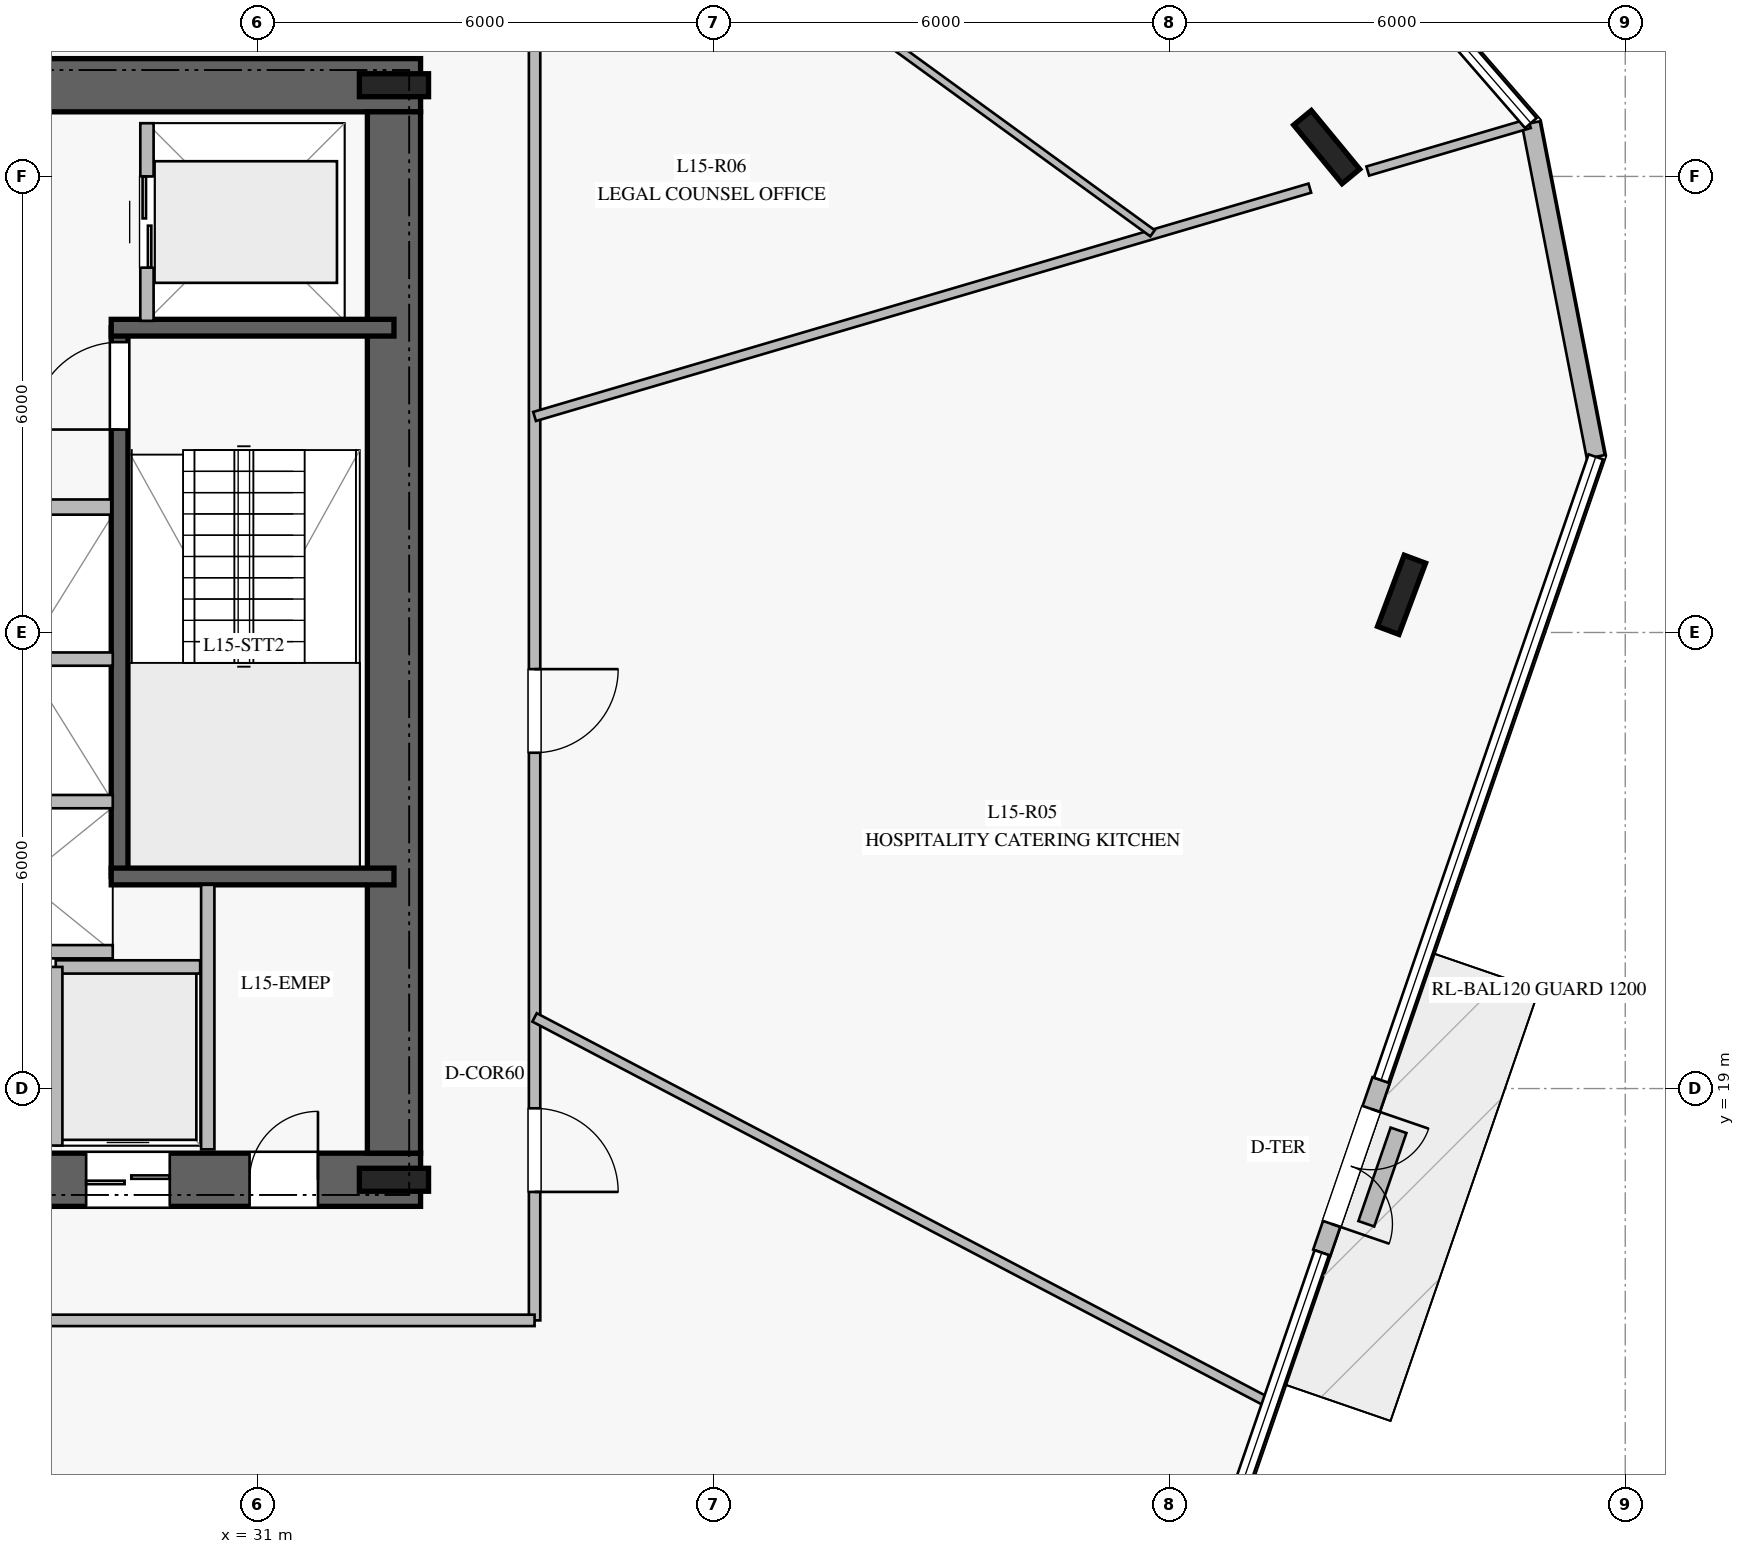
"""IFC4 building model, lengths in metres.
Left out: names, types, materials, properties, quantities, classifications, styles, units other than length and angle.
Written with IfcOpenShell. Run it as: python <this file> out.ifc"""

import sys

from ifc_helpers import new_model, si_unit, direction, frame, frame_2d, origin, origin_2d, place, context, subcontext, project, spatial, rectangle, i_section, extrude, element, fill, save


model = new_model("IFC4")
c1 = context("Model", 3, precision=1e-05, world=origin(), true_north=direction((0.0, 1.0)))
c2 = subcontext(c1, "Body", "Model", "MODEL_VIEW")
j1 = project(units=[si_unit("LENGTHUNIT", "METRE"), si_unit("PLANEANGLEUNIT", "RADIAN")], contexts=[c1])
p1 = place(None, origin())
s1 = spatial("IfcSite", under=j1, at=p1, CompositionType="ELEMENT")
p2 = place(p1, origin())
s2 = spatial("IfcBuilding", under=s1, at=p2, CompositionType="ELEMENT")
p3 = place(p2, frame((0.0, 0.0, 64.0)))
s3 = spatial("IfcBuildingStorey", under=s2, at=p3, CompositionType="ELEMENT", Elevation=64.0)
p4 = place(p3, frame((16.85, 17.8, 0.0), z_axis=(0.0, 0.0, 1.0), x_axis=(1.0, 0.0, 0.0)))
e1 = element("IfcWall", 1, at=p4, inside=s3, PredefinedType="SHEAR", context=c2, shape_type="SweptSolid", body=[
    extrude(rectangle(XDim=16.3, YDim=0.7, at=frame_2d((8.15, 0.0))), origin(), (0.0, 0.0, 1.0), 3.76),
])
p5 = place(p4, frame((5.1, 0.0, 0.0)))
e2 = element("IfcOpeningElement", 2, at=p5, cuts=e1, PredefinedType="OPENING", context=c2, shape_type="SweptSolid", body=[
    extrude(rectangle(XDim=1.2, YDim=2.25, at=frame_2d((0.6, 1.125))), frame((0.0, 0.36, 0.0), z_axis=(0.0, -1.0, 0.0), x_axis=(1.0, 0.0, 0.0)), (0.0, 0.0, 1.0), 0.72),
])
p6 = place(p4, frame((14.05, 0.0, 0.0)))
e3 = element("IfcOpeningElement", 3, at=p6, cuts=e1, PredefinedType="OPENING", context=c2, shape_type="SweptSolid", body=[
    extrude(rectangle(XDim=0.9, YDim=2.1, at=frame_2d((0.45, 1.05))), frame((0.0, 0.36, 0.0), z_axis=(0.0, -1.0, 0.0), x_axis=(1.0, 0.0, 0.0)), (0.0, 0.0, 1.0), 0.72),
])
p7 = place(p4, frame((7.95, 0.0, 0.0)))
e4 = element("IfcOpeningElement", 4, at=p7, cuts=e1, PredefinedType="OPENING", context=c2, shape_type="SweptSolid", body=[
    extrude(rectangle(XDim=1.1, YDim=2.2, at=frame_2d((0.55, 1.1))), frame((0.0, 0.36, 0.0), z_axis=(0.0, -1.0, 0.0), x_axis=(1.0, 0.0, 0.0)), (0.0, 0.0, 1.0), 0.72),
])
p8 = place(p4, frame((9.925, 0.0, 0.0)))
e5 = element("IfcOpeningElement", 5, at=p8, cuts=e1, PredefinedType="OPENING", context=c2, shape_type="SweptSolid", body=[
    extrude(rectangle(XDim=1.1, YDim=2.2, at=frame_2d((0.55, 1.1))), frame((0.0, 0.36, 0.0), z_axis=(0.0, -1.0, 0.0), x_axis=(1.0, 0.0, 0.0)), (0.0, 0.0, 1.0), 0.72),
])
p9 = place(p4, frame((11.9, 0.0, 0.0)))
e6 = element("IfcOpeningElement", 6, at=p9, cuts=e1, PredefinedType="OPENING", context=c2, shape_type="SweptSolid", body=[
    extrude(rectangle(XDim=1.1, YDim=2.2, at=frame_2d((0.55, 1.1))), frame((0.0, 0.36, 0.0), z_axis=(0.0, -1.0, 0.0), x_axis=(1.0, 0.0, 0.0)), (0.0, 0.0, 1.0), 0.72),
])
p10 = place(p3, frame((33.15, 32.2, 0.0), z_axis=(0.0, 0.0, 1.0), x_axis=(-1.0, 0.0, 0.0)))
e7 = element("IfcWall", 7, at=p10, inside=s3, PredefinedType="SHEAR", context=c2, shape_type="SweptSolid", body=[
    extrude(rectangle(XDim=16.3, YDim=0.7, at=frame_2d((8.15, 0.0))), origin(), (0.0, 0.0, 1.0), 3.76),
])
p11 = place(p10, frame((5.1, 0.0, 0.0)))
e8 = element("IfcOpeningElement", 8, at=p11, cuts=e7, PredefinedType="OPENING", context=c2, shape_type="SweptSolid", body=[
    extrude(rectangle(XDim=1.2, YDim=2.25, at=frame_2d((0.6, 1.125))), frame((0.0, 0.36, 0.0), z_axis=(0.0, -1.0, 0.0), x_axis=(1.0, 0.0, 0.0)), (0.0, 0.0, 1.0), 0.72),
])
p12 = place(p3, frame((32.8, 18.15, 0.0), z_axis=(0.0, 0.0, 1.0), x_axis=(0.0, 1.0, 0.0)))
e9 = element("IfcWall", 9, at=p12, inside=s3, PredefinedType="SHEAR", context=c2, shape_type="SweptSolid", body=[
    extrude(rectangle(XDim=13.7, YDim=0.7, at=frame_2d((6.85, 0.0))), origin(), (0.0, 0.0, 1.0), 3.76),
])
for number, where, z_axis, x_axis in (
    (10, (32.8, 17.8, 0.0), (0.0, 0.0, 1.0), (1.0, 0.0, 0.0)),
    (11, (32.8, 32.2, 0.0), (0.0, 0.0, 1.0), (1.0, 0.0, 0.0)),
):
    element("IfcColumn", number, at=place(p3, frame(where, z_axis=z_axis, x_axis=x_axis)), inside=s3, PredefinedType="COLUMN", context=c2, shape_type="SweptSolid", body=[
        extrude(i_section(OverallWidth=0.302, OverallDepth=0.91, WebThickness=0.021, FlangeThickness=0.04, at=origin_2d()), origin(), (0.0, 0.0, 1.0), 4.0),
    ])
p13 = place(p3, frame((29.19, 21.79, 0.0), z_axis=(0.0, 0.0, 1.0), x_axis=(0.0, 1.0, 0.0)))
e12 = element("IfcWall", 12, at=p13, inside=s3, PredefinedType="SOLIDWALL", context=c2, shape_type="SweptSolid", body=[
    extrude(rectangle(XDim=7.22, YDim=0.22, at=frame_2d((3.61, 0.0))), origin(), (0.0, 0.0, 1.0), 3.76),
])
p14 = place(p13, frame((5.88, 0.0, 0.0)))
e13 = element("IfcOpeningElement", 13, at=p14, cuts=e12, PredefinedType="OPENING", context=c2, shape_type="SweptSolid", body=[
    extrude(rectangle(XDim=1.15, YDim=2.2, at=frame_2d((0.575, 1.1))), frame((0.0, 0.12, 0.0), z_axis=(0.0, -1.0, 0.0), x_axis=(1.0, 0.0, 0.0)), (0.0, 0.0, 1.0), 0.24),
])
for number, where, z_axis, x_axis in (
    (14, (29.08, 21.79, 0.0), (0.0, 0.0, 1.0), (1.0, 0.0, 0.0)),
    (15, (29.08, 29.01, 0.0), (0.0, 0.0, 1.0), (1.0, 0.0, 0.0)),
):
    element("IfcWall", number, at=place(p3, frame(where, z_axis=z_axis, x_axis=x_axis)), inside=s3, PredefinedType="SOLIDWALL", context=c2, shape_type="SweptSolid", body=[
        extrude(rectangle(XDim=3.72, YDim=0.22, at=frame_2d((1.86, 0.0))), origin(), (0.0, 0.0, 1.0), 3.76),
    ])
for number, where, z_axis, x_axis in (
    (16, (45.072, 31.386, 0.0), (0.0, 0.0, 1.0), (-0.636, 0.772, 0.0)),
    (17, (46.057, 25.496, 0.0), (0.0, 0.0, 1.0), (0.35, 0.937, 0.0)),
):
    element("IfcColumn", number, at=place(p3, frame(where, z_axis=z_axis, x_axis=x_axis)), inside=s3, PredefinedType="COLUMN", context=c2, shape_type="SweptSolid", body=[
        extrude(i_section(OverallWidth=0.3, OverallDepth=1.0, WebThickness=0.019, FlangeThickness=0.036, at=origin_2d()), origin(), (0.0, 0.0, 1.0), 4.0),
    ])
p15 = place(p3, frame((45.007, 16.841, 0.0), z_axis=(0.0, 0.0, 1.0), x_axis=(0.32533555883, 0.945598632698, 0.0)))
e18 = element("IfcWall", 18, at=p15, inside=s3, PredefinedType="STANDARD", context=c2, shape_type="SweptSolid", body=[
    extrude(rectangle(XDim=2.401, YDim=0.24, at=frame_2d((1.2, 0.0))), origin(), (0.0, 0.0, 1.0), 3.76),
])
p16 = place(p15, frame((0.4, 0.0, 0.0)))
e19 = element("IfcOpeningElement", 19, at=p16, cuts=e18, PredefinedType="OPENING", context=c2, shape_type="SweptSolid", body=[
    extrude(rectangle(XDim=1.6, YDim=2.25, at=frame_2d((0.8, 1.125))), frame((0.0, 0.13, 0.0), z_axis=(0.0, -1.0, 0.0), x_axis=(1.0, 0.0, 0.0)), (0.0, 0.0, 1.0), 0.26),
])
p17 = place(p3, frame((48.612, 27.311, 0.0), z_axis=(0.0, 0.0, 1.0), x_axis=(-0.190917867073, 0.981606014668, 0.0)))
e20 = element("IfcWall", 20, at=p17, inside=s3, PredefinedType="STANDARD", context=c2, shape_type="SweptSolid", body=[
    extrude(rectangle(XDim=4.473, YDim=0.24, at=frame_2d((2.237, 0.0))), origin(), (0.0, 0.0, 1.0), 3.76),
])
p18 = place(p3, frame((45.593, 17.221, 0.0), z_axis=(0.0, 0.0, 1.0), x_axis=(0.325950201404, 0.945386939938, 0.0)))
e21 = element("IfcWall", 21, at=p18, inside=s3, PredefinedType="USERDEFINED", context=c2, shape_type="SweptSolid", body=[
    extrude(rectangle(XDim=1.301, YDim=0.22, at=frame_2d((0.65, 0.0))), origin(), (0.0, 0.0, 1.0), 0.4),
])
p19 = place(p3, frame((25.7, 26.65, 0.0), z_axis=(0.0, 0.0, 1.0), x_axis=(1.0, 0.0, 0.0)))
e22 = element("IfcWall", 22, at=p19, inside=s3, PredefinedType="PARTITIONING", context=c2, shape_type="SweptSolid", body=[
    extrude(rectangle(XDim=3.38, YDim=0.2, at=frame_2d((1.69, 0.0))), origin(), (0.0, 0.0, 1.0), 3.76),
])
p20 = place(p3, frame((30.35, 18.2, 0.0), z_axis=(0.0, 0.0, 1.0), x_axis=(0.0, 1.0, 0.0)))
e23 = element("IfcWall", 23, at=p20, inside=s3, PredefinedType="PARTITIONING", context=c2, shape_type="SweptSolid", body=[
    extrude(rectangle(XDim=3.48, YDim=0.175, at=frame_2d((1.74, 0.0))), origin(), (0.0, 0.0, 1.0), 3.76),
])
p21 = place(p3, frame((28.35, 20.6, 0.0), z_axis=(0.0, 0.0, 1.0), x_axis=(1.0, 0.0, 0.0)))
e24 = element("IfcWall", 24, at=p21, inside=s3, PredefinedType="PARTITIONING", context=c2, shape_type="SweptSolid", body=[
    extrude(rectangle(XDim=1.9, YDim=0.175, at=frame_2d((0.95, 0.0))), origin(), (0.0, 0.0, 1.0), 3.76),
])
for number, where, z_axis, x_axis in (
    (25, (28.35, 18.25, 0.0), (0.0, 0.0, 1.0), (0.0, 1.0, 0.0)),
    (26, (26.75, 20.8, 0.0), (0.0, 0.0, 1.0), (1.0, 0.0, 0.0)),
    (27, (26.75, 22.775, 0.0), (0.0, 0.0, 1.0), (1.0, 0.0, 0.0)),
    (28, (26.75, 24.65, 0.0), (0.0, 0.0, 1.0), (1.0, 0.0, 0.0)),
):
    element("IfcWall", number, at=place(p3, frame(where, z_axis=z_axis, x_axis=x_axis)), inside=s3, PredefinedType="PARTITIONING", context=c2, shape_type="SweptSolid", body=[
        extrude(rectangle(XDim=2.35, YDim=0.175, at=frame_2d((1.175, 0.0))), origin(), (0.0, 0.0, 1.0), 3.76),
    ])
p22 = place(p3, frame((29.55, 29.1, 0.0), z_axis=(0.0, 0.0, 1.0), x_axis=(0.0, 1.0, 0.0)))
e29 = element("IfcWall", 29, at=p22, inside=s3, PredefinedType="PARTITIONING", context=c2, shape_type="SweptSolid", body=[
    extrude(rectangle(XDim=2.6, YDim=0.175, at=frame_2d((1.3, 0.0))), origin(), (0.0, 0.0, 1.0), 3.76),
])
p23 = place(p22, frame((0.7, 0.0, 0.0)))
e30 = element("IfcOpeningElement", 30, at=p23, cuts=e29, PredefinedType="OPENING", context=c2, shape_type="SweptSolid", body=[
    extrude(rectangle(XDim=1.2, YDim=2.2, at=frame_2d((0.6, 1.1))), frame((0.0, 0.098, 0.0), z_axis=(0.0, -1.0, 0.0), x_axis=(1.0, 0.0, 0.0)), (0.0, 0.0, 1.0), 0.195),
])
p24 = place(p3, frame((34.65, 34.05, 0.0), z_axis=(0.0, 0.0, 1.0), x_axis=(0.0, -1.0, 0.0)))
e31 = element("IfcWall", 31, at=p24, inside=s3, PredefinedType="PARTITIONING", context=c2, shape_type="SweptSolid", body=[
    extrude(rectangle(XDim=18.1, YDim=0.15, at=frame_2d((9.05, 0.0))), origin(), (0.0, 0.0, 1.0), 3.21),
])
p25 = place(p24, frame((15.31, 0.0, 0.0)))
e32 = element("IfcOpeningElement", 32, at=p25, cuts=e31, PredefinedType="OPENING", context=c2, shape_type="SweptSolid", body=[
    extrude(rectangle(XDim=1.1, YDim=2.2, at=frame_2d((0.55, 1.1))), frame((0.0, 0.085, 0.0), z_axis=(0.0, -1.0, 0.0), x_axis=(1.0, 0.0, 0.0)), (0.0, 0.0, 1.0), 0.17),
])
p26 = place(p24, frame((9.532, 0.0, 0.0)))
e33 = element("IfcOpeningElement", 33, at=p26, cuts=e31, PredefinedType="OPENING", context=c2, shape_type="SweptSolid", body=[
    extrude(rectangle(XDim=1.1, YDim=2.2, at=frame_2d((0.55, 1.1))), frame((0.0, 0.085, 0.0), z_axis=(0.0, -1.0, 0.0), x_axis=(1.0, 0.0, 0.0)), (0.0, 0.0, 1.0), 0.17),
])
p27 = place(p3, frame((34.65, 15.95, 0.0), z_axis=(0.0, 0.0, 1.0), x_axis=(-1.0, 0.0, 0.0)))
e34 = element("IfcWall", 34, at=p27, inside=s3, PredefinedType="PARTITIONING", context=c2, shape_type="SweptSolid", body=[
    extrude(rectangle(XDim=19.3, YDim=0.15, at=frame_2d((9.65, 0.0))), origin(), (0.0, 0.0, 1.0), 3.21),
])
p28 = place(p27, frame((12.856, 0.0, 0.0)))
e35 = element("IfcOpeningElement", 35, at=p28, cuts=e34, PredefinedType="OPENING", context=c2, shape_type="SweptSolid", body=[
    extrude(rectangle(XDim=1.1, YDim=2.2, at=frame_2d((0.55, 1.1))), frame((0.0, 0.085, 0.0), z_axis=(0.0, -1.0, 0.0), x_axis=(1.0, 0.0, 0.0)), (0.0, 0.0, 1.0), 0.17),
])
p29 = place(p3, frame((26.759, 15.95, 0.0), z_axis=(0.0, 0.0, 1.0), x_axis=(0.190830458369, -0.981623011221, 0.0)))
e36 = element("IfcWall", 36, at=p29, inside=s3, PredefinedType="PARTITIONING", context=c2, shape_type="SweptSolid", body=[
    extrude(rectangle(XDim=12.336, YDim=0.125, at=frame_2d((6.168, 0.0))), origin(), (0.0, 0.0, 1.0), 3.02),
])
p30 = place(p3, frame((34.65, 19.936, 0.0), z_axis=(0.0, 0.0, 1.0), x_axis=(0.885490007515, -0.464658419262, 0.0)))
e37 = element("IfcWall", 37, at=p30, inside=s3, PredefinedType="PARTITIONING", context=c2, shape_type="SweptSolid", body=[
    extrude(rectangle(XDim=10.907, YDim=0.125, at=frame_2d((5.454, 0.0))), origin(), (0.0, 0.0, 1.0), 3.05),
])
p31 = place(p3, frame((34.65, 27.842, 0.0), z_axis=(0.0, 0.0, 1.0), x_axis=(0.959267461701, 0.282499445878, 0.0)))
e38 = element("IfcWall", 38, at=p31, inside=s3, PredefinedType="PARTITIONING", context=c2, shape_type="SweptSolid", body=[
    extrude(rectangle(XDim=10.633, YDim=0.125, at=frame_2d((5.317, 0.0))), origin(), (0.0, 0.0, 1.0), 3.06),
])
p32 = place(p3, frame((45.612, 31.071, 0.0), z_axis=(0.0, 0.0, 1.0), x_axis=(0.95931639147, 0.282333244689, 0.0)))
e39 = element("IfcWall", 39, at=p32, inside=s3, PredefinedType="PARTITIONING", context=c2, shape_type="SweptSolid", body=[
    extrude(rectangle(XDim=2.217, YDim=0.125, at=frame_2d((1.108, 0.0))), origin(), (0.0, 0.0, 1.0), 3.76),
])
p33 = place(p3, frame((42.78, 30.252, 0.0), z_axis=(0.0, 0.0, 1.0), x_axis=(-0.808986344623, 0.587827435744, 0.0)))
e40 = element("IfcWall", 40, at=p33, inside=s3, PredefinedType="MOVABLE", context=c2, shape_type="SweptSolid", body=[
    extrude(rectangle(XDim=14.297, YDim=0.1, at=frame_2d((7.148, 0.0))), origin(), (0.0, 0.0, 1.0), 3.21),
])
p34 = place(p33, frame((6.56, 0.0, 0.0)))
e41 = element("IfcOpeningElement", 41, at=p34, cuts=e40, PredefinedType="OPENING", context=c2, shape_type="SweptSolid", body=[
    extrude(rectangle(XDim=1.0, YDim=2.15, at=frame_2d((0.5, 1.075))), frame((0.0, 0.06, 0.0), z_axis=(0.0, -1.0, 0.0), x_axis=(1.0, 0.0, 0.0)), (0.0, 0.0, 1.0), 0.12),
])
p35 = place(p16, frame((1.6, 0.0, 0.0), z_axis=(0.0, 0.0, 1.0), x_axis=(-1.0, 0.0, 0.0)))
e42 = element("IfcDoor", 42, at=p35, inside=s3, OperationType="DOUBLE_DOOR_SINGLE_SWING", PredefinedType="DOOR", context=c2, shape_type="SweptSolid", body=[
    extrude(rectangle(XDim=1.6, YDim=2.25, at=frame_2d((0.8, 1.125))), frame((0.0, 0.025, 0.0), z_axis=(0.0, -1.0, 0.0), x_axis=(1.0, 0.0, 0.0)), (0.0, 0.0, 1.0), 0.05),
])
fill(e19, e42)
p36 = place(p14, origin())
e43 = element("IfcDoor", 43, at=p36, inside=s3, OperationType="SINGLE_SWING_LEFT", PredefinedType="DOOR", context=c2, shape_type="SweptSolid", body=[
    extrude(rectangle(XDim=1.15, YDim=2.2, at=frame_2d((0.575, 1.1))), frame((0.0, 0.025, 0.0), z_axis=(0.0, -1.0, 0.0), x_axis=(1.0, 0.0, 0.0)), (0.0, 0.0, 1.0), 0.05),
])
fill(e13, e43)
p37 = place(p6, origin())
e44 = element("IfcDoor", 44, at=p37, inside=s3, OperationType="SINGLE_SWING_RIGHT", PredefinedType="DOOR", context=c2, shape_type="SweptSolid", body=[
    extrude(rectangle(XDim=0.9, YDim=2.1, at=frame_2d((0.45, 1.05))), frame((0.0, 0.025, 0.0), z_axis=(0.0, -1.0, 0.0), x_axis=(1.0, 0.0, 0.0)), (0.0, 0.0, 1.0), 0.05),
])
fill(e3, e44)
p38 = place(p9, origin())
e45 = element("IfcDoor", 45, at=p38, inside=s3, OperationType="DOUBLE_DOOR_SLIDING", PredefinedType="DOOR", context=c2, shape_type="SweptSolid", body=[
    extrude(rectangle(XDim=1.1, YDim=2.2, at=frame_2d((0.55, 1.1))), frame((0.0, 0.025, 0.0), z_axis=(0.0, -1.0, 0.0), x_axis=(1.0, 0.0, 0.0)), (0.0, 0.0, 1.0), 0.05),
])
fill(e6, e45)
p39 = place(p23, origin())
e46 = element("IfcDoor", 46, at=p39, inside=s3, OperationType="DOUBLE_DOOR_SLIDING", PredefinedType="DOOR", context=c2, shape_type="SweptSolid", body=[
    extrude(rectangle(XDim=1.2, YDim=2.2, at=frame_2d((0.6, 1.1))), frame((0.0, 0.025, 0.0), z_axis=(0.0, -1.0, 0.0), x_axis=(1.0, 0.0, 0.0)), (0.0, 0.0, 1.0), 0.05),
])
fill(e30, e46)
p40 = place(p25, origin())
e47 = element("IfcDoor", 47, at=p40, inside=s3, OperationType="SINGLE_SWING_RIGHT", PredefinedType="DOOR", context=c2, shape_type="SweptSolid", body=[
    extrude(rectangle(XDim=1.1, YDim=2.2, at=frame_2d((0.55, 1.1))), frame((0.0, 0.025, 0.0), z_axis=(0.0, -1.0, 0.0), x_axis=(1.0, 0.0, 0.0)), (0.0, 0.0, 1.0), 0.05),
])
fill(e32, e47)
p41 = place(p26, origin())
e48 = element("IfcDoor", 48, at=p41, inside=s3, OperationType="SINGLE_SWING_LEFT", PredefinedType="DOOR", context=c2, shape_type="SweptSolid", body=[
    extrude(rectangle(XDim=1.1, YDim=2.2, at=frame_2d((0.55, 1.1))), frame((0.0, 0.025, 0.0), z_axis=(0.0, -1.0, 0.0), x_axis=(1.0, 0.0, 0.0)), (0.0, 0.0, 1.0), 0.05),
])
fill(e33, e48)
save(model, sys.argv[1])
